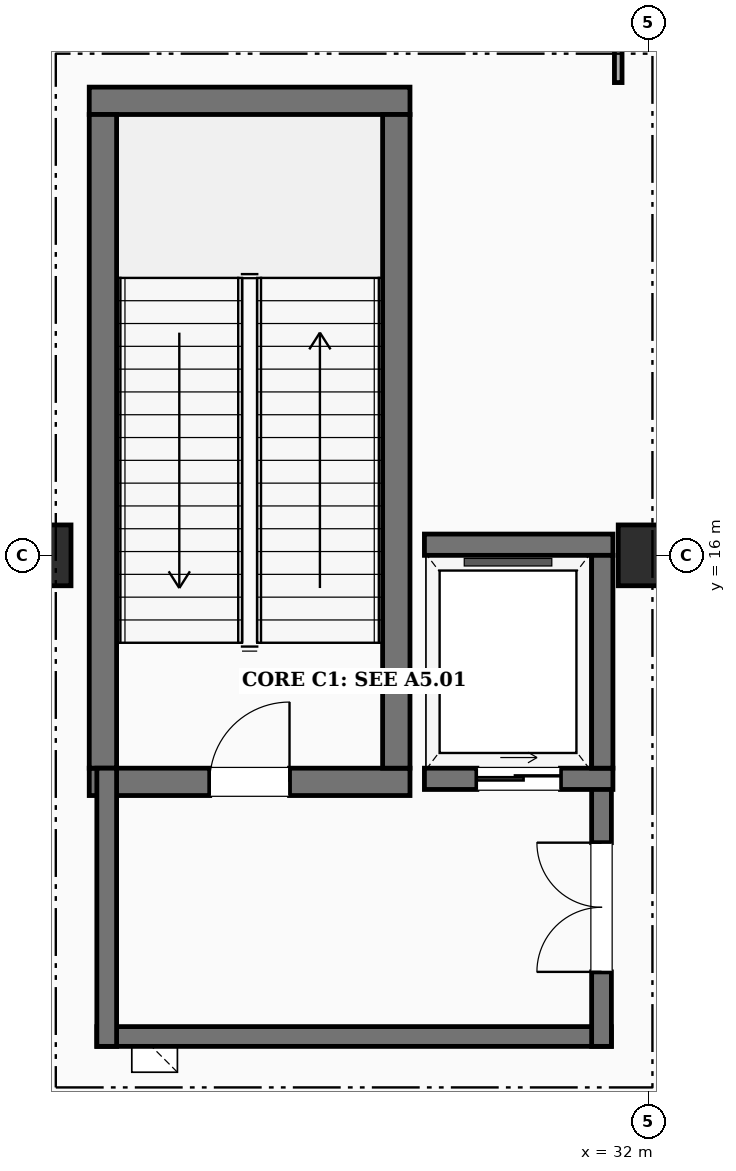
"""IFC4 building model, lengths in metres.
Left out: names, types, materials, properties, quantities, classifications, styles, units other than length and angle.
Written with IfcOpenShell. Run it as: python <this file> out.ifc"""

import sys

from ifc_helpers import new_model, si_unit, direction, frame, frame_2d, origin, origin_2d, place, context, subcontext, project, spatial, rectangle, extrude, element, fill, save


model = new_model("IFC4")
c1 = context("Model", 3, precision=1e-05, world=origin(), true_north=direction((0.0, 1.0)))
c2 = subcontext(c1, "Body", "Model", "MODEL_VIEW")
j1 = project(units=[si_unit("LENGTHUNIT", "METRE"), si_unit("PLANEANGLEUNIT", "RADIAN")], contexts=[c1])
p1 = place(None, origin())
s1 = spatial("IfcSite", under=j1, at=p1, CompositionType="ELEMENT")
p2 = place(p1, origin())
s2 = spatial("IfcBuilding", under=s1, at=p2, CompositionType="ELEMENT")
p3 = place(p2, frame((0.0, 0.0, -5.4)))
s3 = spatial("IfcBuildingStorey", under=s2, at=p3, CompositionType="ELEMENT", Elevation=-5.4)
for number, where, z_axis, x_axis in (
    (1, (24.0, 16.0, -0.4), (0.0, 0.0, 1.0), (1.0, 0.0, 0.0)),
    (2, (32.0, 16.0, -0.4), (0.0, 0.0, 1.0), (1.0, 0.0, 0.0)),
):
    element("IfcColumn", number, at=place(p3, frame(where, z_axis=z_axis, x_axis=x_axis)), inside=s3, PredefinedType="COLUMN", context=c2, shape_type="SweptSolid", body=[
        extrude(rectangle(XDim=0.8, YDim=0.8, at=origin_2d()), origin(), (0.0, 0.0, 1.0), 5.8),
    ])
p4 = place(p3, frame((24.64, 13.02, 0.0), z_axis=(0.0, 0.0, 1.0), x_axis=(1.0, 0.0, 0.0)))
e3 = element("IfcWall", 3, at=p4, inside=s3, PredefinedType="SHEAR", context=c2, shape_type="SweptSolid", body=[
    extrude(rectangle(XDim=4.22, YDim=0.36, at=frame_2d((2.11, 0.0))), origin(), (0.0, 0.0, 1.0), 5.4),
])
p5 = place(p4, frame((1.585, 0.0, 0.0)))
e4 = element("IfcOpeningElement", 4, at=p5, cuts=e3, PredefinedType="OPENING", context=c2, shape_type="SweptSolid", body=[
    extrude(rectangle(XDim=1.05, YDim=2.15, at=frame_2d((0.525, 1.075))), frame((0.0, 0.19, 0.0), z_axis=(0.0, -1.0, 0.0), x_axis=(1.0, 0.0, 0.0)), (0.0, 0.0, 1.0), 0.38),
])
p6 = place(p3, frame((24.64, 21.98, 0.0), z_axis=(0.0, 0.0, 1.0), x_axis=(1.0, 0.0, 0.0)))
e5 = element("IfcWall", 5, at=p6, inside=s3, PredefinedType="SHEAR", context=c2, shape_type="SweptSolid", body=[
    extrude(rectangle(XDim=4.22, YDim=0.36, at=frame_2d((2.11, 0.0))), origin(), (0.0, 0.0, 1.0), 5.4),
])
for number, where, z_axis, x_axis in (
    (6, (24.82, 13.2, 0.0), (0.0, 0.0, 1.0), (0.0, 1.0, 0.0)),
    (7, (28.68, 13.2, 0.0), (0.0, 0.0, 1.0), (0.0, 1.0, 0.0)),
):
    element("IfcWall", number, at=place(p3, frame(where, z_axis=z_axis, x_axis=x_axis)), inside=s3, PredefinedType="SHEAR", context=c2, shape_type="SweptSolid", body=[
        extrude(rectangle(XDim=8.6, YDim=0.36, at=frame_2d((4.3, 0.0))), origin(), (0.0, 0.0, 1.0), 5.4),
    ])
p7 = place(p3, frame((31.51, 9.67, 0.0), z_axis=(0.0, 0.0, 1.0), x_axis=(-1.0, 0.0, 0.0)))
e8 = element("IfcWall", 8, at=p7, inside=s3, PredefinedType="SHEAR", context=c2, shape_type="SweptSolid", body=[
    extrude(rectangle(XDim=6.77, YDim=0.26, at=frame_2d((3.385, 0.0))), origin(), (0.0, 0.0, 1.0), 5.4),
])
p8 = place(p3, frame((24.87, 9.54, 0.0), z_axis=(0.0, 0.0, 1.0), x_axis=(0.0, 1.0, 0.0)))
e9 = element("IfcWall", 9, at=p8, inside=s3, PredefinedType="SHEAR", context=c2, shape_type="SweptSolid", body=[
    extrude(rectangle(XDim=3.66, YDim=0.26, at=frame_2d((1.83, 0.0))), origin(), (0.0, 0.0, 1.0), 5.4),
])
p9 = place(p3, frame((31.38, 9.54, 0.0), z_axis=(0.0, 0.0, 1.0), x_axis=(0.0, 1.0, 0.0)))
e10 = element("IfcWall", 10, at=p9, inside=s3, PredefinedType="SHEAR", context=c2, shape_type="SweptSolid", body=[
    extrude(rectangle(XDim=3.66, YDim=0.26, at=frame_2d((1.83, 0.0))), origin(), (0.0, 0.0, 1.0), 5.4),
])
p10 = place(p9, frame((0.98, 0.0, 0.0)))
e11 = element("IfcOpeningElement", 11, at=p10, cuts=e10, PredefinedType="OPENING", context=c2, shape_type="SweptSolid", body=[
    extrude(rectangle(XDim=1.7, YDim=2.2, at=frame_2d((0.85, 1.1))), frame((0.0, 0.14, 0.0), z_axis=(0.0, -1.0, 0.0), x_axis=(1.0, 0.0, 0.0)), (0.0, 0.0, 1.0), 0.28),
])
p11 = place(p3, frame((29.05, 13.06, 0.0), z_axis=(0.0, 0.0, 1.0), x_axis=(1.0, 0.0, 0.0)))
e12 = element("IfcWall", 12, at=p11, inside=s3, PredefinedType="SHEAR", context=c2, shape_type="SweptSolid", body=[
    extrude(rectangle(XDim=2.48, YDim=0.28, at=frame_2d((1.24, 0.0))), origin(), (0.0, 0.0, 1.0), 5.4),
])
p12 = place(p11, frame((0.69, 0.0, 0.0)))
e13 = element("IfcOpeningElement", 13, at=p12, cuts=e12, PredefinedType="OPENING", context=c2, shape_type="SweptSolid", body=[
    extrude(rectangle(XDim=1.1, YDim=2.15, at=frame_2d((0.55, 1.075))), frame((0.0, 0.15, 0.0), z_axis=(0.0, -1.0, 0.0), x_axis=(1.0, 0.0, 0.0)), (0.0, 0.0, 1.0), 0.3),
])
p13 = place(p3, frame((29.05, 16.14, 0.0), z_axis=(0.0, 0.0, 1.0), x_axis=(1.0, 0.0, 0.0)))
e14 = element("IfcWall", 14, at=p13, inside=s3, PredefinedType="SHEAR", context=c2, shape_type="SweptSolid", body=[
    extrude(rectangle(XDim=2.48, YDim=0.28, at=frame_2d((1.24, 0.0))), origin(), (0.0, 0.0, 1.0), 5.4),
])
p14 = place(p3, frame((31.39, 13.2, 0.0), z_axis=(0.0, 0.0, 1.0), x_axis=(0.0, 1.0, 0.0)))
e15 = element("IfcWall", 15, at=p14, inside=s3, PredefinedType="SHEAR", context=c2, shape_type="SweptSolid", body=[
    extrude(rectangle(XDim=2.8, YDim=0.28, at=frame_2d((1.4, 0.0))), origin(), (0.0, 0.0, 1.0), 5.4),
])
p15 = place(p3, frame((31.6, 22.22, 0.0), z_axis=(0.0, 0.0, 1.0), x_axis=(0.0, 1.0, 0.0)))
e16 = element("IfcWall", 16, at=p15, inside=s3, PredefinedType="PARTITIONING", context=c2, shape_type="SweptSolid", body=[
    extrude(rectangle(XDim=21.26, YDim=0.1, at=frame_2d((10.63, 0.0))), origin(), (0.0, 0.0, 1.0), 4.15),
])
p16 = place(p15, frame((12.158, 0.0, 0.0)))
e17 = element("IfcOpeningElement", 17, at=p16, cuts=e16, PredefinedType="OPENING", context=c2, shape_type="SweptSolid", body=[
    extrude(rectangle(XDim=1.65, YDim=2.25, at=frame_2d((0.825, 1.125))), frame((0.0, 0.06, 0.0), z_axis=(0.0, -1.0, 0.0), x_axis=(1.0, 0.0, 0.0)), (0.0, 0.0, 1.0), 0.12),
])
p17 = place(p5, origin())
e18 = element("IfcDoor", 18, at=p17, inside=s3, OperationType="SINGLE_SWING_RIGHT", PredefinedType="DOOR", context=c2, shape_type="SweptSolid", body=[
    extrude(rectangle(XDim=1.05, YDim=2.15, at=frame_2d((0.525, 1.075))), frame((0.0, 0.025, 0.0), z_axis=(0.0, -1.0, 0.0), x_axis=(1.0, 0.0, 0.0)), (0.0, 0.0, 1.0), 0.05),
])
fill(e4, e18)
p18 = place(p10, origin())
e19 = element("IfcDoor", 19, at=p18, inside=s3, OperationType="DOUBLE_DOOR_SINGLE_SWING", PredefinedType="DOOR", context=c2, shape_type="SweptSolid", body=[
    extrude(rectangle(XDim=1.7, YDim=2.2, at=frame_2d((0.85, 1.1))), frame((0.0, 0.025, 0.0), z_axis=(0.0, -1.0, 0.0), x_axis=(1.0, 0.0, 0.0)), (0.0, 0.0, 1.0), 0.05),
])
fill(e11, e19)
p19 = place(p12, origin())
e20 = element("IfcDoor", 20, at=p19, inside=s3, OperationType="SLIDING_TO_LEFT", PredefinedType="DOOR", context=c2, shape_type="SweptSolid", body=[
    extrude(rectangle(XDim=1.1, YDim=2.15, at=frame_2d((0.55, 1.075))), frame((0.0, 0.025, 0.0), z_axis=(0.0, -1.0, 0.0), x_axis=(1.0, 0.0, 0.0)), (0.0, 0.0, 1.0), 0.05),
])
fill(e13, e20)
save(model, sys.argv[1])
